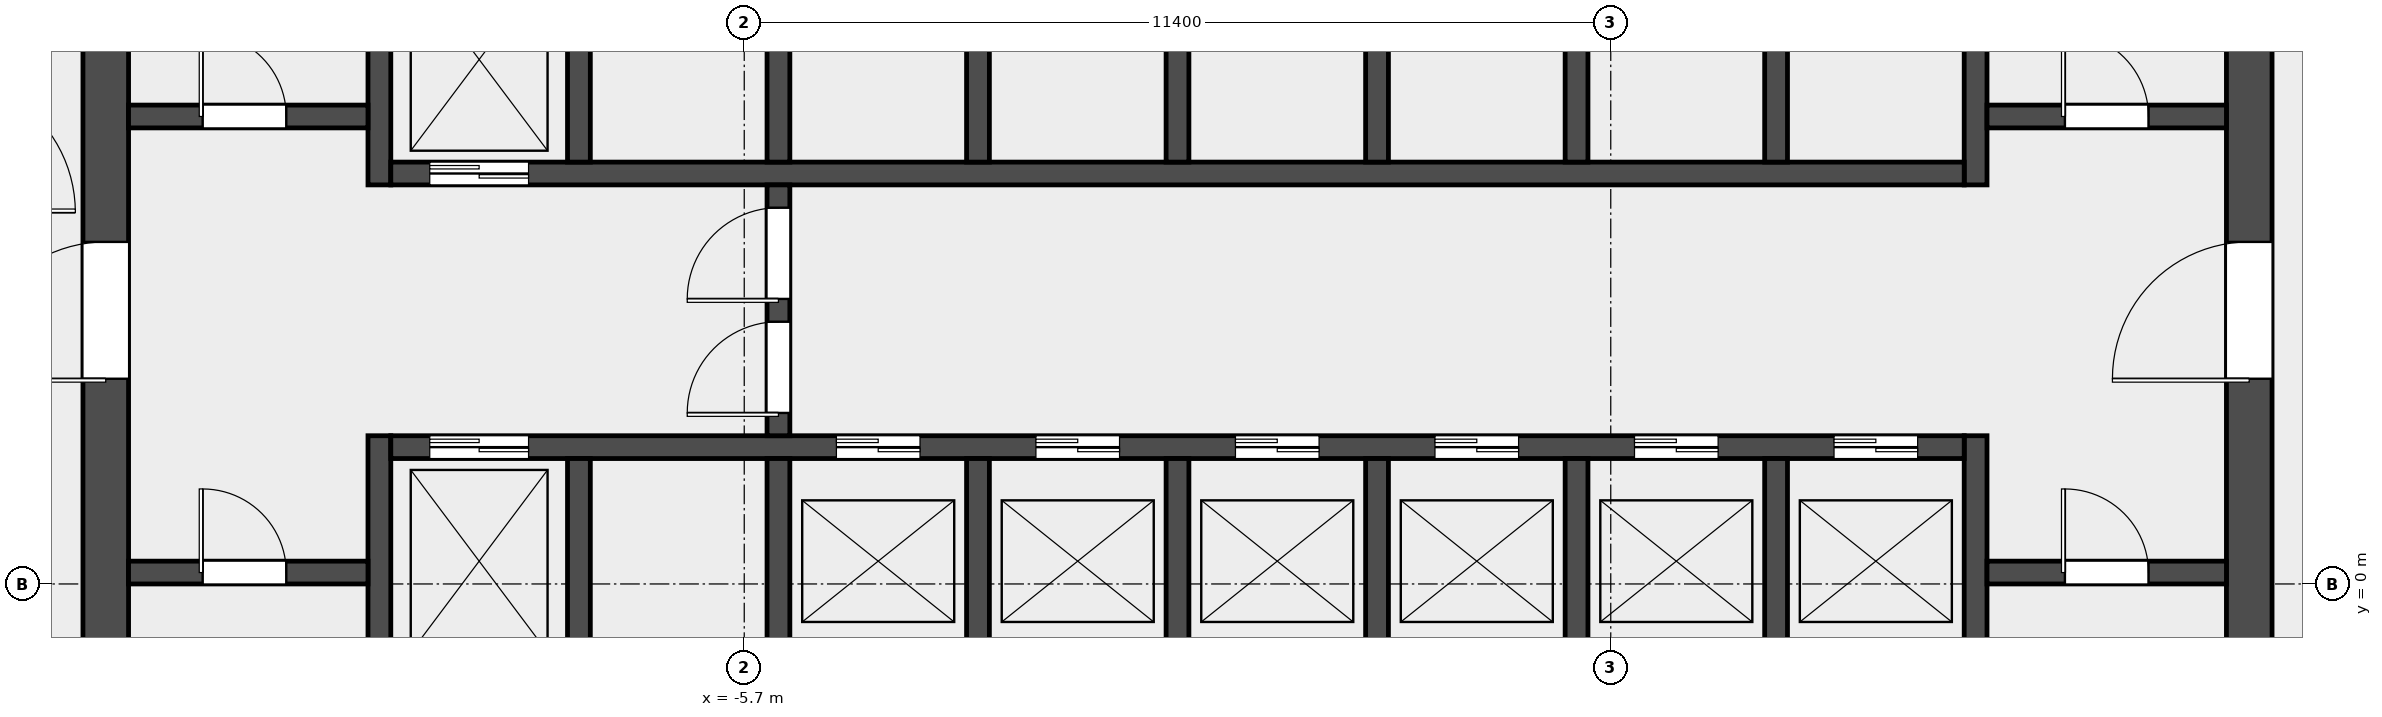
"""IFC4 building model, lengths in metres.
Left out: names, types, materials, properties, quantities, classifications, styles, units other than length and angle.
Written with IfcOpenShell. Run it as: python <this file> out.ifc"""

import sys

from ifc_helpers import new_model, si_unit, direction, frame, frame_2d, origin, place, context, subcontext, project, spatial, rectangle, extrude, element, fill, save


model = new_model("IFC4")
c1 = context("Model", 3, precision=1e-05, world=origin(), true_north=direction((0.0, 1.0)))
c2 = subcontext(c1, "Body", "Model", "MODEL_VIEW")
j1 = project(units=[si_unit("LENGTHUNIT", "METRE"), si_unit("PLANEANGLEUNIT", "RADIAN")], contexts=[c1])
p1 = place(None, origin())
s1 = spatial("IfcSite", under=j1, at=p1, CompositionType="ELEMENT")
p2 = place(p1, origin())
s2 = spatial("IfcBuilding", under=s1, at=p2, CompositionType="ELEMENT")
p3 = place(p2, frame((0.0, 0.0, 130.6)))
s3 = spatial("IfcBuildingStorey", under=s2, at=p3, CompositionType="ELEMENT", Elevation=130.6)
p4 = place(p3, frame((-14.1, -6.6, 0.0), z_axis=(0.0, 0.0, 1.0), x_axis=(0.0, 1.0, 0.0)))
e1 = element("IfcWall", 1, at=p4, inside=s3, PredefinedType="SHEAR", context=c2, shape_type="SweptSolid", body=[
    extrude(rectangle(XDim=19.5, YDim=0.6, at=frame_2d((9.75, 0.0))), origin(), (0.0, 0.0, 1.0), 4.2),
])
p5 = place(p4, frame((9.3, 0.0, 0.0)))
e2 = element("IfcOpeningElement", 2, at=p5, cuts=e1, PredefinedType="OPENING", context=c2, shape_type="SweptSolid", body=[
    extrude(rectangle(XDim=1.8, YDim=2.1, at=frame_2d((0.9, 1.05))), frame((0.0, 0.312, 0.0), z_axis=(0.0, -1.0, 0.0), x_axis=(1.0, 0.0, 0.0)), (0.0, 0.0, 1.0), 0.624),
])
p6 = place(p3, frame((14.1, -6.6, 0.0), z_axis=(0.0, 0.0, 1.0), x_axis=(0.0, 1.0, 0.0)))
e3 = element("IfcWall", 3, at=p6, inside=s3, PredefinedType="SHEAR", context=c2, shape_type="SweptSolid", body=[
    extrude(rectangle(XDim=19.5, YDim=0.6, at=frame_2d((9.75, 0.0))), origin(), (0.0, 0.0, 1.0), 4.2),
])
p7 = place(p6, frame((9.3, 0.0, 0.0)))
e4 = element("IfcOpeningElement", 4, at=p7, cuts=e3, PredefinedType="OPENING", context=c2, shape_type="SweptSolid", body=[
    extrude(rectangle(XDim=1.8, YDim=2.1, at=frame_2d((0.9, 1.05))), frame((0.0, 0.312, 0.0), z_axis=(0.0, -1.0, 0.0), x_axis=(1.0, 0.0, 0.0)), (0.0, 0.0, 1.0), 0.624),
])
p8 = place(p3, frame((-10.5, -6.6, 0.0), z_axis=(0.0, 0.0, 1.0), x_axis=(0.0, 1.0, 0.0)))
e5 = element("IfcWall", 5, at=p8, inside=s3, PredefinedType="SHEAR", context=c2, shape_type="SweptSolid", body=[
    extrude(rectangle(XDim=8.55, YDim=0.3, at=frame_2d((4.275, 0.0))), origin(), (0.0, 0.0, 1.0), 4.2),
])
p9 = place(p3, frame((-10.5, 5.25, 0.0), z_axis=(0.0, 0.0, 1.0), x_axis=(0.0, 1.0, 0.0)))
e6 = element("IfcWall", 6, at=p9, inside=s3, PredefinedType="SHEAR", context=c2, shape_type="SweptSolid", body=[
    extrude(rectangle(XDim=7.65, YDim=0.3, at=frame_2d((3.825, 0.0))), origin(), (0.0, 0.0, 1.0), 4.2),
])
p10 = place(p3, frame((10.5, -6.6, 0.0), z_axis=(0.0, 0.0, 1.0), x_axis=(0.0, 1.0, 0.0)))
e7 = element("IfcWall", 7, at=p10, inside=s3, PredefinedType="SHEAR", context=c2, shape_type="SweptSolid", body=[
    extrude(rectangle(XDim=8.55, YDim=0.3, at=frame_2d((4.275, 0.0))), origin(), (0.0, 0.0, 1.0), 4.2),
])
p11 = place(p3, frame((10.5, 5.25, 0.0), z_axis=(0.0, 0.0, 1.0), x_axis=(0.0, 1.0, 0.0)))
e8 = element("IfcWall", 8, at=p11, inside=s3, PredefinedType="SHEAR", context=c2, shape_type="SweptSolid", body=[
    extrude(rectangle(XDim=7.65, YDim=0.3, at=frame_2d((3.825, 0.0))), origin(), (0.0, 0.0, 1.0), 4.2),
])
p12 = place(p3, frame((-13.8, 0.15, 0.0), z_axis=(0.0, 0.0, 1.0), x_axis=(1.0, 0.0, 0.0)))
e9 = element("IfcWall", 9, at=p12, inside=s3, PredefinedType="SOLIDWALL", context=c2, shape_type="SweptSolid", body=[
    extrude(rectangle(XDim=3.15, YDim=0.3, at=frame_2d((1.575, 0.0))), origin(), (0.0, 0.0, 1.0), 4.2),
])
p13 = place(p12, frame((0.975, 0.0, 0.0)))
e10 = element("IfcOpeningElement", 10, at=p13, cuts=e9, PredefinedType="OPENING", context=c2, shape_type="SweptSolid", body=[
    extrude(rectangle(XDim=1.1, YDim=2.1, at=frame_2d((0.55, 1.05))), frame((0.0, 0.162, 0.0), z_axis=(0.0, -1.0, 0.0), x_axis=(1.0, 0.0, 0.0)), (0.0, 0.0, 1.0), 0.324),
])
p14 = place(p3, frame((-13.8, 6.15, 0.0), z_axis=(0.0, 0.0, 1.0), x_axis=(1.0, 0.0, 0.0)))
e11 = element("IfcWall", 11, at=p14, inside=s3, PredefinedType="SOLIDWALL", context=c2, shape_type="SweptSolid", body=[
    extrude(rectangle(XDim=3.15, YDim=0.3, at=frame_2d((1.575, 0.0))), origin(), (0.0, 0.0, 1.0), 4.2),
])
p15 = place(p14, frame((0.975, 0.0, 0.0)))
e12 = element("IfcOpeningElement", 12, at=p15, cuts=e11, PredefinedType="OPENING", context=c2, shape_type="SweptSolid", body=[
    extrude(rectangle(XDim=1.1, YDim=2.1, at=frame_2d((0.55, 1.05))), frame((0.0, 0.162, 0.0), z_axis=(0.0, -1.0, 0.0), x_axis=(1.0, 0.0, 0.0)), (0.0, 0.0, 1.0), 0.324),
])
p16 = place(p3, frame((10.65, 0.15, 0.0), z_axis=(0.0, 0.0, 1.0), x_axis=(1.0, 0.0, 0.0)))
e13 = element("IfcWall", 13, at=p16, inside=s3, PredefinedType="SOLIDWALL", context=c2, shape_type="SweptSolid", body=[
    extrude(rectangle(XDim=3.15, YDim=0.3, at=frame_2d((1.575, 0.0))), origin(), (0.0, 0.0, 1.0), 4.2),
])
p17 = place(p16, frame((1.025, 0.0, 0.0)))
e14 = element("IfcOpeningElement", 14, at=p17, cuts=e13, PredefinedType="OPENING", context=c2, shape_type="SweptSolid", body=[
    extrude(rectangle(XDim=1.1, YDim=2.1, at=frame_2d((0.55, 1.05))), frame((0.0, 0.162, 0.0), z_axis=(0.0, -1.0, 0.0), x_axis=(1.0, 0.0, 0.0)), (0.0, 0.0, 1.0), 0.324),
])
p18 = place(p3, frame((10.65, 6.15, 0.0), z_axis=(0.0, 0.0, 1.0), x_axis=(1.0, 0.0, 0.0)))
e15 = element("IfcWall", 15, at=p18, inside=s3, PredefinedType="SOLIDWALL", context=c2, shape_type="SweptSolid", body=[
    extrude(rectangle(XDim=3.15, YDim=0.3, at=frame_2d((1.575, 0.0))), origin(), (0.0, 0.0, 1.0), 4.2),
])
p19 = place(p18, frame((1.025, 0.0, 0.0)))
e16 = element("IfcOpeningElement", 16, at=p19, cuts=e15, PredefinedType="OPENING", context=c2, shape_type="SweptSolid", body=[
    extrude(rectangle(XDim=1.1, YDim=2.1, at=frame_2d((0.55, 1.05))), frame((0.0, 0.162, 0.0), z_axis=(0.0, -1.0, 0.0), x_axis=(1.0, 0.0, 0.0)), (0.0, 0.0, 1.0), 0.324),
])
p20 = place(p3, frame((-10.35, 1.8, 0.0), z_axis=(0.0, 0.0, 1.0), x_axis=(1.0, 0.0, 0.0)))
e17 = element("IfcWall", 17, at=p20, inside=s3, PredefinedType="SOLIDWALL", context=c2, shape_type="SweptSolid", body=[
    extrude(rectangle(XDim=20.7, YDim=0.3, at=frame_2d((10.35, 0.0))), origin(), (0.0, 0.0, 1.0), 4.2),
])
p21 = place(p20, frame((0.512, 0.0, 0.0)))
e18 = element("IfcOpeningElement", 18, at=p21, cuts=e17, PredefinedType="OPENING", context=c2, shape_type="SweptSolid", body=[
    extrude(rectangle(XDim=1.3, YDim=2.1, at=frame_2d((0.65, 1.05))), frame((0.0, 0.162, 0.0), z_axis=(0.0, -1.0, 0.0), x_axis=(1.0, 0.0, 0.0)), (0.0, 0.0, 1.0), 0.324),
])
p22 = place(p20, frame((5.863, 0.0, 0.0)))
e19 = element("IfcOpeningElement", 19, at=p22, cuts=e17, PredefinedType="OPENING", context=c2, shape_type="SweptSolid", body=[
    extrude(rectangle(XDim=1.1, YDim=2.1, at=frame_2d((0.55, 1.05))), frame((0.0, 0.162, 0.0), z_axis=(0.0, -1.0, 0.0), x_axis=(1.0, 0.0, 0.0)), (0.0, 0.0, 1.0), 0.324),
])
p23 = place(p20, frame((8.488, 0.0, 0.0)))
e20 = element("IfcOpeningElement", 20, at=p23, cuts=e17, PredefinedType="OPENING", context=c2, shape_type="SweptSolid", body=[
    extrude(rectangle(XDim=1.1, YDim=2.1, at=frame_2d((0.55, 1.05))), frame((0.0, 0.162, 0.0), z_axis=(0.0, -1.0, 0.0), x_axis=(1.0, 0.0, 0.0)), (0.0, 0.0, 1.0), 0.324),
])
p24 = place(p20, frame((11.113, 0.0, 0.0)))
e21 = element("IfcOpeningElement", 21, at=p24, cuts=e17, PredefinedType="OPENING", context=c2, shape_type="SweptSolid", body=[
    extrude(rectangle(XDim=1.1, YDim=2.1, at=frame_2d((0.55, 1.05))), frame((0.0, 0.162, 0.0), z_axis=(0.0, -1.0, 0.0), x_axis=(1.0, 0.0, 0.0)), (0.0, 0.0, 1.0), 0.324),
])
p25 = place(p20, frame((13.738, 0.0, 0.0)))
e22 = element("IfcOpeningElement", 22, at=p25, cuts=e17, PredefinedType="OPENING", context=c2, shape_type="SweptSolid", body=[
    extrude(rectangle(XDim=1.1, YDim=2.1, at=frame_2d((0.55, 1.05))), frame((0.0, 0.162, 0.0), z_axis=(0.0, -1.0, 0.0), x_axis=(1.0, 0.0, 0.0)), (0.0, 0.0, 1.0), 0.324),
])
p26 = place(p20, frame((16.363, 0.0, 0.0)))
e23 = element("IfcOpeningElement", 23, at=p26, cuts=e17, PredefinedType="OPENING", context=c2, shape_type="SweptSolid", body=[
    extrude(rectangle(XDim=1.1, YDim=2.1, at=frame_2d((0.55, 1.05))), frame((0.0, 0.162, 0.0), z_axis=(0.0, -1.0, 0.0), x_axis=(1.0, 0.0, 0.0)), (0.0, 0.0, 1.0), 0.324),
])
p27 = place(p20, frame((18.988, 0.0, 0.0)))
e24 = element("IfcOpeningElement", 24, at=p27, cuts=e17, PredefinedType="OPENING", context=c2, shape_type="SweptSolid", body=[
    extrude(rectangle(XDim=1.1, YDim=2.1, at=frame_2d((0.55, 1.05))), frame((0.0, 0.162, 0.0), z_axis=(0.0, -1.0, 0.0), x_axis=(1.0, 0.0, 0.0)), (0.0, 0.0, 1.0), 0.324),
])
p28 = place(p3, frame((-10.35, 5.4, 0.0), z_axis=(0.0, 0.0, 1.0), x_axis=(1.0, 0.0, 0.0)))
e25 = element("IfcWall", 25, at=p28, inside=s3, PredefinedType="SOLIDWALL", context=c2, shape_type="SweptSolid", body=[
    extrude(rectangle(XDim=20.7, YDim=0.3, at=frame_2d((10.35, 0.0))), origin(), (0.0, 0.0, 1.0), 4.2),
])
p29 = place(p28, frame((0.512, 0.0, 0.0)))
e26 = element("IfcOpeningElement", 26, at=p29, cuts=e25, PredefinedType="OPENING", context=c2, shape_type="SweptSolid", body=[
    extrude(rectangle(XDim=1.3, YDim=2.1, at=frame_2d((0.65, 1.05))), frame((0.0, 0.162, 0.0), z_axis=(0.0, -1.0, 0.0), x_axis=(1.0, 0.0, 0.0)), (0.0, 0.0, 1.0), 0.324),
])
for number, where, z_axis, x_axis in (
    (27, (-7.875, -1.05, 0.0), (0.0, 0.0, 1.0), (0.0, 1.0, 0.0)),
    (28, (-5.25, -1.05, 0.0), (0.0, 0.0, 1.0), (0.0, 1.0, 0.0)),
    (29, (-2.625, -1.05, 0.0), (0.0, 0.0, 1.0), (0.0, 1.0, 0.0)),
    (30, (0.0, -1.05, 0.0), (0.0, 0.0, 1.0), (0.0, 1.0, 0.0)),
    (31, (2.625, -1.05, 0.0), (0.0, 0.0, 1.0), (0.0, 1.0, 0.0)),
    (32, (5.25, -1.05, 0.0), (0.0, 0.0, 1.0), (0.0, 1.0, 0.0)),
    (33, (7.875, -1.05, 0.0), (0.0, 0.0, 1.0), (0.0, 1.0, 0.0)),
    (34, (-7.875, 5.55, 0.0), (0.0, 0.0, 1.0), (0.0, 1.0, 0.0)),
    (35, (-5.25, 5.55, 0.0), (0.0, 0.0, 1.0), (0.0, 1.0, 0.0)),
    (36, (-2.625, 5.55, 0.0), (0.0, 0.0, 1.0), (0.0, 1.0, 0.0)),
    (37, (0.0, 5.55, 0.0), (0.0, 0.0, 1.0), (0.0, 1.0, 0.0)),
    (38, (2.625, 5.55, 0.0), (0.0, 0.0, 1.0), (0.0, 1.0, 0.0)),
    (39, (5.25, 5.55, 0.0), (0.0, 0.0, 1.0), (0.0, 1.0, 0.0)),
    (40, (7.875, 5.55, 0.0), (0.0, 0.0, 1.0), (0.0, 1.0, 0.0)),
):
    element("IfcWall", number, at=place(p3, frame(where, z_axis=z_axis, x_axis=x_axis)), inside=s3, PredefinedType="SOLIDWALL", context=c2, shape_type="SweptSolid", body=[
        extrude(rectangle(XDim=2.7, YDim=0.3, at=frame_2d((1.35, 0.0))), origin(), (0.0, 0.0, 1.0), 4.2),
    ])
p30 = place(p3, frame((-5.25, 1.95, 0.0), z_axis=(0.0, 0.0, 1.0), x_axis=(0.0, 1.0, 0.0)))
e41 = element("IfcWall", 41, at=p30, inside=s3, PredefinedType="SOLIDWALL", context=c2, shape_type="SweptSolid", body=[
    extrude(rectangle(XDim=3.3, YDim=0.3, at=frame_2d((1.65, 0.0))), origin(), (0.0, 0.0, 1.0), 4.2),
])
p31 = place(p30, frame((0.3, 0.0, 0.0)))
e42 = element("IfcOpeningElement", 42, at=p31, cuts=e41, PredefinedType="OPENING", context=c2, shape_type="SweptSolid", body=[
    extrude(rectangle(XDim=1.2, YDim=2.1, at=frame_2d((0.6, 1.05))), frame((0.0, 0.162, 0.0), z_axis=(0.0, -1.0, 0.0), x_axis=(1.0, 0.0, 0.0)), (0.0, 0.0, 1.0), 0.324),
])
p32 = place(p30, frame((1.8, 0.0, 0.0)))
e43 = element("IfcOpeningElement", 43, at=p32, cuts=e41, PredefinedType="OPENING", context=c2, shape_type="SweptSolid", body=[
    extrude(rectangle(XDim=1.2, YDim=2.1, at=frame_2d((0.6, 1.05))), frame((0.0, 0.162, 0.0), z_axis=(0.0, -1.0, 0.0), x_axis=(1.0, 0.0, 0.0)), (0.0, 0.0, 1.0), 0.324),
])
p33 = place(p13, origin())
e44 = element("IfcDoor", 44, at=p33, inside=s3, OperationType="SINGLE_SWING_LEFT", PredefinedType="DOOR", context=c2, shape_type="SweptSolid", body=[
    extrude(rectangle(XDim=1.1, YDim=2.1, at=frame_2d((0.55, 1.05))), frame((0.0, 0.025, 0.0), z_axis=(0.0, -1.0, 0.0), x_axis=(1.0, 0.0, 0.0)), (0.0, 0.0, 1.0), 0.05),
])
fill(e10, e44)
p34 = place(p15, origin())
e45 = element("IfcDoor", 45, at=p34, inside=s3, OperationType="SINGLE_SWING_LEFT", PredefinedType="DOOR", context=c2, shape_type="SweptSolid", body=[
    extrude(rectangle(XDim=1.1, YDim=2.1, at=frame_2d((0.55, 1.05))), frame((0.0, 0.025, 0.0), z_axis=(0.0, -1.0, 0.0), x_axis=(1.0, 0.0, 0.0)), (0.0, 0.0, 1.0), 0.05),
])
fill(e12, e45)
p35 = place(p17, origin())
e46 = element("IfcDoor", 46, at=p35, inside=s3, OperationType="SINGLE_SWING_RIGHT", PredefinedType="DOOR", context=c2, shape_type="SweptSolid", body=[
    extrude(rectangle(XDim=1.1, YDim=2.1, at=frame_2d((0.55, 1.05))), frame((0.0, 0.025, 0.0), z_axis=(0.0, -1.0, 0.0), x_axis=(1.0, 0.0, 0.0)), (0.0, 0.0, 1.0), 0.05),
])
fill(e14, e46)
p36 = place(p19, origin())
e47 = element("IfcDoor", 47, at=p36, inside=s3, OperationType="SINGLE_SWING_RIGHT", PredefinedType="DOOR", context=c2, shape_type="SweptSolid", body=[
    extrude(rectangle(XDim=1.1, YDim=2.1, at=frame_2d((0.55, 1.05))), frame((0.0, 0.025, 0.0), z_axis=(0.0, -1.0, 0.0), x_axis=(1.0, 0.0, 0.0)), (0.0, 0.0, 1.0), 0.05),
])
fill(e16, e47)
p37 = place(p5, origin())
e48 = element("IfcDoor", 48, at=p37, inside=s3, OperationType="DOUBLE_DOOR_SINGLE_SWING", PredefinedType="DOOR", context=c2, shape_type="SweptSolid", body=[
    extrude(rectangle(XDim=1.8, YDim=2.1, at=frame_2d((0.9, 1.05))), frame((0.0, 0.025, 0.0), z_axis=(0.0, -1.0, 0.0), x_axis=(1.0, 0.0, 0.0)), (0.0, 0.0, 1.0), 0.05),
])
fill(e2, e48)
p38 = place(p7, origin())
e49 = element("IfcDoor", 49, at=p38, inside=s3, OperationType="DOUBLE_DOOR_SINGLE_SWING", PredefinedType="DOOR", context=c2, shape_type="SweptSolid", body=[
    extrude(rectangle(XDim=1.8, YDim=2.1, at=frame_2d((0.9, 1.05))), frame((0.0, 0.025, 0.0), z_axis=(0.0, -1.0, 0.0), x_axis=(1.0, 0.0, 0.0)), (0.0, 0.0, 1.0), 0.05),
])
fill(e4, e49)
p39 = place(p31, origin())
e50 = element("IfcDoor", 50, at=p39, inside=s3, OperationType="SINGLE_SWING_LEFT", PredefinedType="DOOR", context=c2, shape_type="SweptSolid", body=[
    extrude(rectangle(XDim=1.2, YDim=2.1, at=frame_2d((0.6, 1.05))), frame((0.0, 0.025, 0.0), z_axis=(0.0, -1.0, 0.0), x_axis=(1.0, 0.0, 0.0)), (0.0, 0.0, 1.0), 0.05),
])
fill(e42, e50)
p40 = place(p32, origin())
e51 = element("IfcDoor", 51, at=p40, inside=s3, OperationType="SINGLE_SWING_RIGHT", PredefinedType="DOOR", context=c2, shape_type="SweptSolid", body=[
    extrude(rectangle(XDim=1.2, YDim=2.1, at=frame_2d((0.6, 1.05))), frame((0.0, 0.025, 0.0), z_axis=(0.0, -1.0, 0.0), x_axis=(1.0, 0.0, 0.0)), (0.0, 0.0, 1.0), 0.05),
])
fill(e43, e51)
p41 = place(p21, origin())
e52 = element("IfcDoor", 52, at=p41, inside=s3, OperationType="DOUBLE_DOOR_SLIDING", PredefinedType="DOOR", context=c2, shape_type="SweptSolid", body=[
    extrude(rectangle(XDim=1.3, YDim=2.1, at=frame_2d((0.65, 1.05))), frame((0.0, 0.025, 0.0), z_axis=(0.0, -1.0, 0.0), x_axis=(1.0, 0.0, 0.0)), (0.0, 0.0, 1.0), 0.05),
])
fill(e18, e52)
p42 = place(p22, origin())
e53 = element("IfcDoor", 53, at=p42, inside=s3, OperationType="DOUBLE_DOOR_SLIDING", PredefinedType="DOOR", context=c2, shape_type="SweptSolid", body=[
    extrude(rectangle(XDim=1.1, YDim=2.1, at=frame_2d((0.55, 1.05))), frame((0.0, 0.025, 0.0), z_axis=(0.0, -1.0, 0.0), x_axis=(1.0, 0.0, 0.0)), (0.0, 0.0, 1.0), 0.05),
])
fill(e19, e53)
p43 = place(p23, origin())
e54 = element("IfcDoor", 54, at=p43, inside=s3, OperationType="DOUBLE_DOOR_SLIDING", PredefinedType="DOOR", context=c2, shape_type="SweptSolid", body=[
    extrude(rectangle(XDim=1.1, YDim=2.1, at=frame_2d((0.55, 1.05))), frame((0.0, 0.025, 0.0), z_axis=(0.0, -1.0, 0.0), x_axis=(1.0, 0.0, 0.0)), (0.0, 0.0, 1.0), 0.05),
])
fill(e20, e54)
p44 = place(p24, origin())
e55 = element("IfcDoor", 55, at=p44, inside=s3, OperationType="DOUBLE_DOOR_SLIDING", PredefinedType="DOOR", context=c2, shape_type="SweptSolid", body=[
    extrude(rectangle(XDim=1.1, YDim=2.1, at=frame_2d((0.55, 1.05))), frame((0.0, 0.025, 0.0), z_axis=(0.0, -1.0, 0.0), x_axis=(1.0, 0.0, 0.0)), (0.0, 0.0, 1.0), 0.05),
])
fill(e21, e55)
p45 = place(p25, origin())
e56 = element("IfcDoor", 56, at=p45, inside=s3, OperationType="DOUBLE_DOOR_SLIDING", PredefinedType="DOOR", context=c2, shape_type="SweptSolid", body=[
    extrude(rectangle(XDim=1.1, YDim=2.1, at=frame_2d((0.55, 1.05))), frame((0.0, 0.025, 0.0), z_axis=(0.0, -1.0, 0.0), x_axis=(1.0, 0.0, 0.0)), (0.0, 0.0, 1.0), 0.05),
])
fill(e22, e56)
p46 = place(p26, origin())
e57 = element("IfcDoor", 57, at=p46, inside=s3, OperationType="DOUBLE_DOOR_SLIDING", PredefinedType="DOOR", context=c2, shape_type="SweptSolid", body=[
    extrude(rectangle(XDim=1.1, YDim=2.1, at=frame_2d((0.55, 1.05))), frame((0.0, 0.025, 0.0), z_axis=(0.0, -1.0, 0.0), x_axis=(1.0, 0.0, 0.0)), (0.0, 0.0, 1.0), 0.05),
])
fill(e23, e57)
p47 = place(p27, origin())
e58 = element("IfcDoor", 58, at=p47, inside=s3, OperationType="DOUBLE_DOOR_SLIDING", PredefinedType="DOOR", context=c2, shape_type="SweptSolid", body=[
    extrude(rectangle(XDim=1.1, YDim=2.1, at=frame_2d((0.55, 1.05))), frame((0.0, 0.025, 0.0), z_axis=(0.0, -1.0, 0.0), x_axis=(1.0, 0.0, 0.0)), (0.0, 0.0, 1.0), 0.05),
])
fill(e24, e58)
p48 = place(p29, origin())
e59 = element("IfcDoor", 59, at=p48, inside=s3, OperationType="DOUBLE_DOOR_SLIDING", PredefinedType="DOOR", context=c2, shape_type="SweptSolid", body=[
    extrude(rectangle(XDim=1.3, YDim=2.1, at=frame_2d((0.65, 1.05))), frame((0.0, 0.025, 0.0), z_axis=(0.0, -1.0, 0.0), x_axis=(1.0, 0.0, 0.0)), (0.0, 0.0, 1.0), 0.05),
])
fill(e26, e59)
save(model, sys.argv[1])
